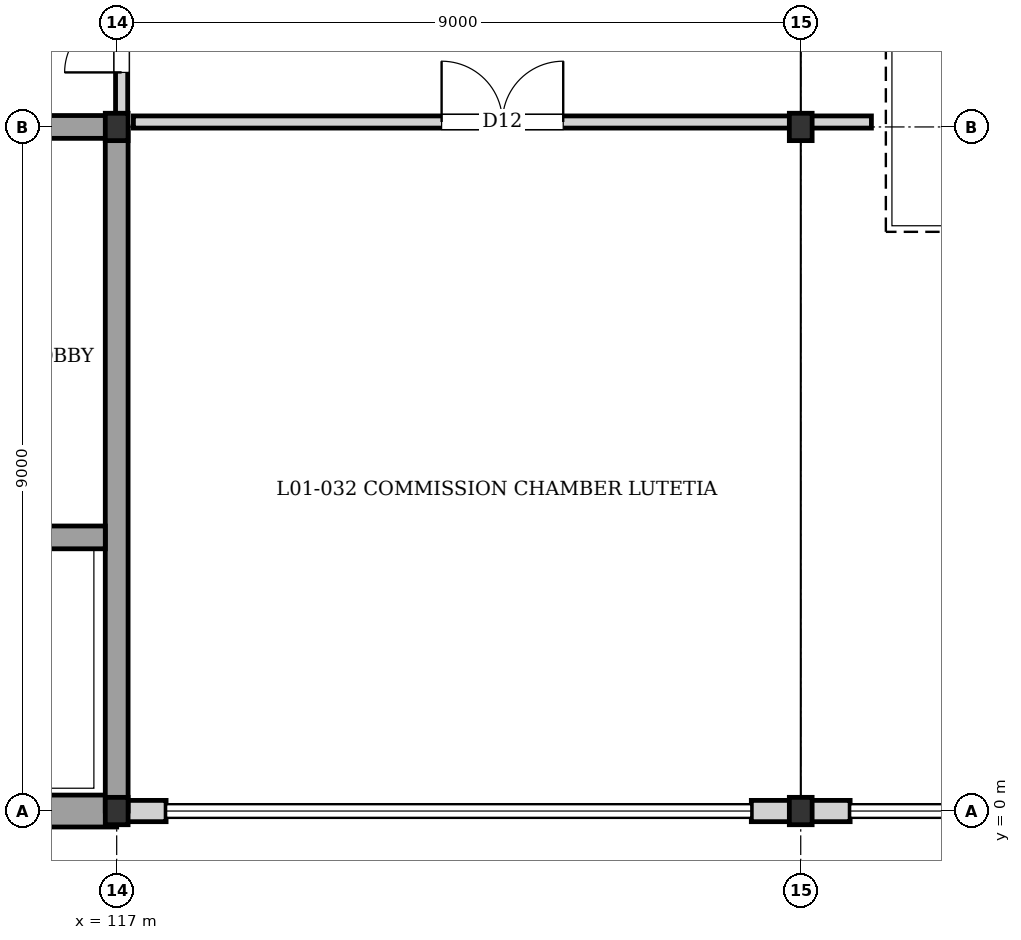
"""IFC4 building model, lengths in metres.
Left out: names, types, materials, properties, quantities, classifications, styles, units other than length and angle.
Written with IfcOpenShell. Run it as: python <this file> out.ifc"""

import sys

from ifc_helpers import new_model, si_unit, direction, frame, frame_2d, origin, origin_2d, place, context, subcontext, project, spatial, rectangle, i_section, extrude, element, fill, save


model = new_model("IFC4")
c1 = context("Model", 3, precision=1e-05, world=origin(), true_north=direction((0.0, 1.0)))
c2 = subcontext(c1, "Body", "Model", "MODEL_VIEW")
j1 = project(units=[si_unit("LENGTHUNIT", "METRE"), si_unit("PLANEANGLEUNIT", "RADIAN")], contexts=[c1])
p1 = place(None, origin())
s1 = spatial("IfcSite", under=j1, at=p1, CompositionType="ELEMENT")
p2 = place(p1, origin())
s2 = spatial("IfcBuilding", under=s1, at=p2, CompositionType="ELEMENT")
p3 = place(p2, frame((0.0, 0.0, 4.32)))
s3 = spatial("IfcBuildingStorey", under=s2, at=p3, CompositionType="ELEMENT", Elevation=4.32)
for number, where, z_axis, x_axis in (
    (1, (117.0, 0.0, 0.0), (0.0, 0.0, 1.0), (1.0, 0.0, 0.0)),
    (2, (117.0, 9.0, 0.0), (0.0, 0.0, 1.0), (1.0, 0.0, 0.0)),
    (3, (126.0, 0.0, 0.0), (0.0, 0.0, 1.0), (1.0, 0.0, 0.0)),
    (4, (126.0, 9.0, 0.0), (0.0, 0.0, 1.0), (1.0, 0.0, 0.0)),
):
    element("IfcColumn", number, at=place(p3, frame(where, z_axis=z_axis, x_axis=x_axis)), inside=s3, PredefinedType="COLUMN", context=c2, shape_type="SweptSolid", body=[
        extrude(i_section(OverallWidth=0.3, OverallDepth=0.36, WebThickness=0.012, FlangeThickness=0.022, at=origin_2d()), origin(), (0.0, 0.0, 1.0), 3.84),
    ])
p4 = place(p3, frame((126.65, 0.0, 0.0), z_axis=(0.0, 0.0, 1.0), x_axis=(-1.0, 0.0, 0.0)))
e5 = element("IfcWall", 5, at=p4, inside=s3, PredefinedType="SOLIDWALL", context=c2, shape_type="SweptSolid", body=[
    extrude(rectangle(XDim=0.65, YDim=0.28, at=frame_2d((0.325, 0.0))), origin(), (0.0, 0.0, 1.0), 3.28),
])
p5 = place(p3, frame((126.0, 0.0, 0.0), z_axis=(0.0, 0.0, 1.0), x_axis=(-1.0, 0.0, 0.0)))
e6 = element("IfcWall", 6, at=p5, inside=s3, PredefinedType="SOLIDWALL", context=c2, shape_type="SweptSolid", body=[
    extrude(rectangle(XDim=0.65, YDim=0.28, at=frame_2d((0.325, 0.0))), origin(), (0.0, 0.0, 1.0), 3.35),
])
p6 = place(p3, frame((117.65, 0.0, 0.0), z_axis=(0.0, 0.0, 1.0), x_axis=(-1.0, 0.0, 0.0)))
e7 = element("IfcWall", 7, at=p6, inside=s3, PredefinedType="SOLIDWALL", context=c2, shape_type="SweptSolid", body=[
    extrude(rectangle(XDim=0.52, YDim=0.28, at=frame_2d((0.26, 0.0))), origin(), (0.0, 0.0, 1.0), 3.35),
])
p7 = place(p3, frame((117.0, 0.0, 0.0), z_axis=(0.0, 0.0, 1.0), x_axis=(-1.0, 0.0, 0.0)))
e8 = element("IfcWall", 8, at=p7, inside=s3, PredefinedType="SOLIDWALL", context=c2, shape_type="SweptSolid", body=[
    extrude(rectangle(XDim=9.0, YDim=0.42, at=frame_2d((4.5, 0.0))), origin(), (0.0, 0.0, 1.0), 3.6),
])
p8 = place(p3, frame((117.0, 0.0, 0.0), z_axis=(0.0, 0.0, 1.0), x_axis=(0.0, 1.0, 0.0)))
e9 = element("IfcWall", 9, at=p8, inside=s3, PredefinedType="SHEAR", context=c2, shape_type="SweptSolid", body=[
    extrude(rectangle(XDim=9.0, YDim=0.3, at=frame_2d((4.5, 0.0))), origin(), (0.0, 0.0, 1.0), 3.6),
])
p9 = place(p3, frame((108.0, 9.0, 0.0), z_axis=(0.0, 0.0, 1.0), x_axis=(1.0, 0.0, 0.0)))
e10 = element("IfcWall", 10, at=p9, inside=s3, PredefinedType="SHEAR", context=c2, shape_type="SweptSolid", body=[
    extrude(rectangle(XDim=9.0, YDim=0.3, at=frame_2d((4.5, 0.0))), origin(), (0.0, 0.0, 1.0), 3.6),
])
p10 = place(p9, frame((6.05, 0.0, 0.0)))
e11 = element("IfcOpeningElement", 11, at=p10, cuts=e10, PredefinedType="OPENING", context=c2, shape_type="SweptSolid", body=[
    extrude(rectangle(XDim=1.4, YDim=2.02, at=frame_2d((0.7, 1.01))), frame((0.0, 0.16, 0.0), z_axis=(0.0, -1.0, 0.0), x_axis=(1.0, 0.0, 0.0)), (0.0, 0.0, 1.0), 0.32),
])
p11 = place(p3, frame((112.65, 3.6, 0.0), z_axis=(0.0, 0.0, 1.0), x_axis=(1.0, 0.0, 0.0)))
e12 = element("IfcWall", 12, at=p11, inside=s3, PredefinedType="SHEAR", context=c2, shape_type="SweptSolid", body=[
    extrude(rectangle(XDim=4.2, YDim=0.3, at=frame_2d((2.1, 0.0))), origin(), (0.0, 0.0, 1.0), 3.6),
])
p12 = place(p11, frame((1.5, 0.0, 0.0)))
e13 = element("IfcOpeningElement", 13, at=p12, cuts=e12, PredefinedType="OPENING", context=c2, shape_type="SweptSolid", body=[
    extrude(rectangle(XDim=1.2, YDim=2.2, at=frame_2d((0.6, 1.1))), frame((0.0, 0.16, 0.0), z_axis=(0.0, -1.0, 0.0), x_axis=(1.0, 0.0, 0.0)), (0.0, 0.0, 1.0), 0.32),
])
p13 = place(p3, frame((117.065, 9.155, 0.0), z_axis=(0.0, 0.0, 1.0), x_axis=(0.0, 1.0, 0.0)))
e14 = element("IfcWall", 14, at=p13, inside=s3, PredefinedType="PARTITIONING", context=c2, shape_type="SweptSolid", body=[
    extrude(rectangle(XDim=2.625, YDim=0.16, at=frame_2d((1.312, 0.0))), origin(), (0.0, 0.0, 1.0), 3.14),
])
p14 = place(p13, frame((0.562, 0.0, 0.0)))
e15 = element("IfcOpeningElement", 15, at=p14, cuts=e14, PredefinedType="OPENING", context=c2, shape_type="SweptSolid", body=[
    extrude(rectangle(XDim=1.5, YDim=2.1, at=frame_2d((0.75, 1.05))), frame((0.0, 0.09, 0.0), z_axis=(0.0, -1.0, 0.0), x_axis=(1.0, 0.0, 0.0)), (0.0, 0.0, 1.0), 0.18),
])
p15 = place(p3, frame((117.22, 9.065, 0.0), z_axis=(0.0, 0.0, 1.0), x_axis=(1.0, 0.0, 0.0)))
e16 = element("IfcWall", 16, at=p15, inside=s3, PredefinedType="PARTITIONING", context=c2, shape_type="SweptSolid", body=[
    extrude(rectangle(XDim=8.76, YDim=0.16, at=frame_2d((4.38, 0.0))), origin(), (0.0, 0.0, 1.0), 2.98),
])
p16 = place(p15, frame((4.055, 0.0, 0.0)))
e17 = element("IfcOpeningElement", 17, at=p16, cuts=e16, PredefinedType="OPENING", context=c2, shape_type="SweptSolid", body=[
    extrude(rectangle(XDim=1.6, YDim=2.3, at=frame_2d((0.8, 1.15))), frame((0.0, 0.09, 0.0), z_axis=(0.0, -1.0, 0.0), x_axis=(1.0, 0.0, 0.0)), (0.0, 0.0, 1.0), 0.18),
])
p17 = place(p3, frame((125.98, 9.065, 0.0), z_axis=(0.0, 0.0, 1.0), x_axis=(1.0, 0.0, 0.0)))
e18 = element("IfcWall", 18, at=p17, inside=s3, PredefinedType="PARTITIONING", context=c2, shape_type="SweptSolid", body=[
    extrude(rectangle(XDim=0.95, YDim=0.16, at=frame_2d((0.475, 0.0))), origin(), (0.0, 0.0, 1.0), 3.6),
])
p18 = place(p14, origin())
e19 = element("IfcDoor", 19, at=p18, inside=s3, OperationType="DOUBLE_DOOR_SINGLE_SWING", PredefinedType="DOOR", context=c2, shape_type="SweptSolid", body=[
    extrude(rectangle(XDim=1.5, YDim=2.1, at=frame_2d((0.75, 1.05))), frame((0.0, 0.025, 0.0), z_axis=(0.0, -1.0, 0.0), x_axis=(1.0, 0.0, 0.0)), (0.0, 0.0, 1.0), 0.05),
])
fill(e15, e19)
p19 = place(p16, origin())
e20 = element("IfcDoor", 20, at=p19, inside=s3, OperationType="DOUBLE_DOOR_SINGLE_SWING", PredefinedType="DOOR", context=c2, shape_type="SweptSolid", body=[
    extrude(rectangle(XDim=1.6, YDim=2.3, at=frame_2d((0.8, 1.15))), frame((0.0, 0.025, 0.0), z_axis=(0.0, -1.0, 0.0), x_axis=(1.0, 0.0, 0.0)), (0.0, 0.0, 1.0), 0.05),
])
fill(e17, e20)
save(model, sys.argv[1])
